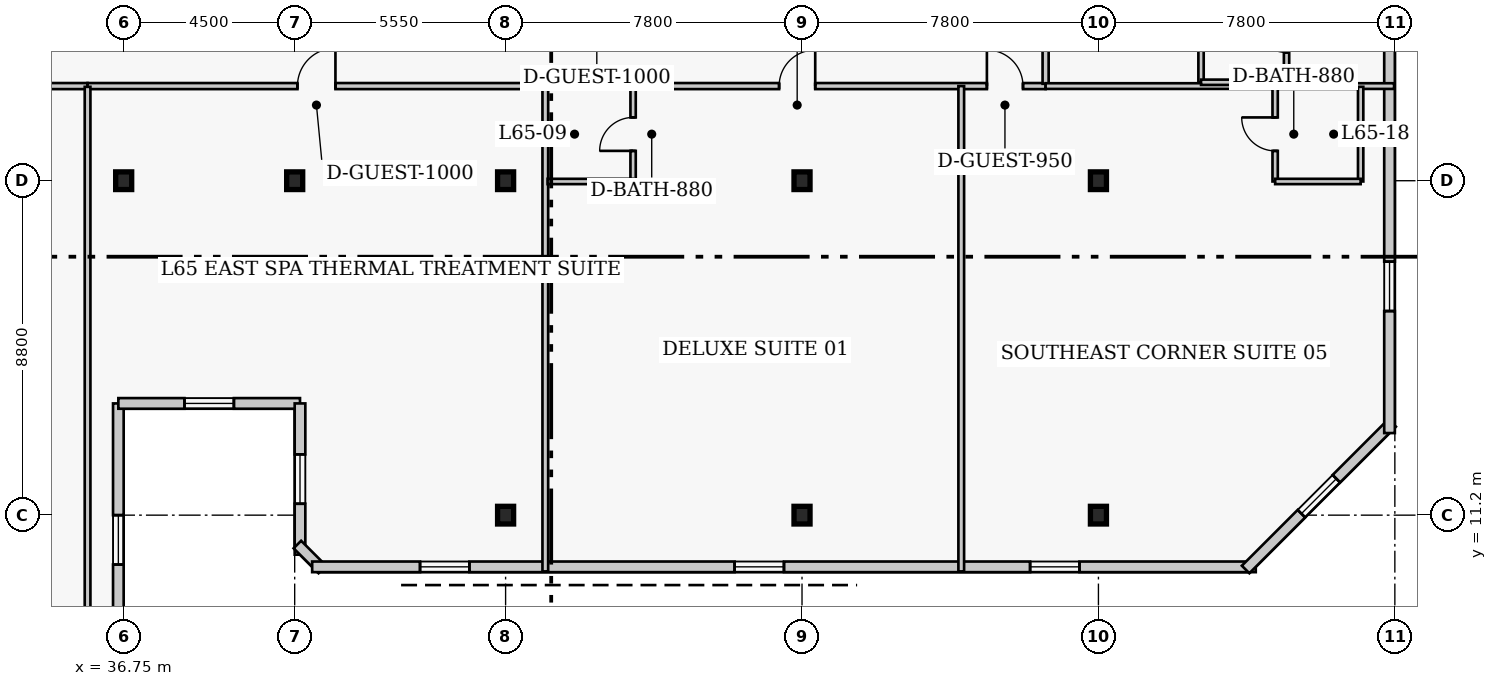
"""IFC4 building model, lengths in metres.
Left out: names, types, materials, properties, quantities, classifications, styles, units other than length and angle.
Written with IfcOpenShell. Run it as: python <this file> out.ifc"""

import sys

from ifc_helpers import new_model, si_unit, direction, frame, frame_2d, origin, origin_2d, place, context, subcontext, project, spatial, rectangle, i_section, extrude, element, fill, save


model = new_model("IFC4")
c1 = context("Model", 3, precision=1e-05, world=origin(), true_north=direction((0.0, 1.0)))
c2 = subcontext(c1, "Body", "Model", "MODEL_VIEW")
j1 = project(units=[si_unit("LENGTHUNIT", "METRE"), si_unit("PLANEANGLEUNIT", "RADIAN")], contexts=[c1])
p1 = place(None, origin())
s1 = spatial("IfcSite", under=j1, at=p1, CompositionType="ELEMENT")
p2 = place(p1, origin())
s2 = spatial("IfcBuilding", under=s1, at=p2, CompositionType="ELEMENT")
p3 = place(p2, frame((0.0, 0.0, 261.4)))
s3 = spatial("IfcBuildingStorey", under=s2, at=p3, CompositionType="ELEMENT", Elevation=261.4)
for number, where, z_axis, x_axis in (
    (1, (36.75, 20.0, 0.0), (0.0, 0.0, 1.0), (1.0, 0.0, 0.0)),
    (2, (41.25, 20.0, 0.0), (0.0, 0.0, 1.0), (1.0, 0.0, 0.0)),
    (3, (46.8, 11.2, 0.0), (0.0, 0.0, 1.0), (1.0, 0.0, 0.0)),
    (4, (46.8, 20.0, 0.0), (0.0, 0.0, 1.0), (1.0, 0.0, 0.0)),
    (5, (54.6, 11.2, 0.0), (0.0, 0.0, 1.0), (1.0, 0.0, 0.0)),
    (6, (54.6, 20.0, 0.0), (0.0, 0.0, 1.0), (1.0, 0.0, 0.0)),
    (7, (62.4, 11.2, 0.0), (0.0, 0.0, 1.0), (1.0, 0.0, 0.0)),
    (8, (62.4, 20.0, 0.0), (0.0, 0.0, 1.0), (1.0, 0.0, 0.0)),
):
    element("IfcColumn", number, at=place(p3, frame(where, z_axis=z_axis, x_axis=x_axis)), inside=s3, PredefinedType="COLUMN", context=c2, shape_type="SweptSolid", body=[
        extrude(i_section(OverallWidth=0.422, OverallDepth=0.465, WebThickness=0.045, FlangeThickness=0.073, FilletRadius=0.017, at=origin_2d()), origin(), (0.0, 0.0, 1.0), 4.0),
    ])
p4 = place(p3, frame((36.61, 6.96, 0.0), z_axis=(0.0, 0.0, 1.0), x_axis=(0.0, 1.0, 0.0)))
e9 = element("IfcWall", 9, at=p4, inside=s3, PredefinedType="SOLIDWALL", context=c2, shape_type="SweptSolid", body=[
    extrude(rectangle(XDim=7.18, YDim=0.28, at=frame_2d((3.59, 0.0))), origin(), (0.0, 0.0, 1.0), 3.76),
])
p5 = place(p4, frame((2.94, 0.0, 0.85)))
e10 = element("IfcOpeningElement", 10, at=p5, cuts=e9, PredefinedType="OPENING", context=c2, shape_type="SweptSolid", body=[
    extrude(rectangle(XDim=1.3, YDim=1.7, at=frame_2d((0.65, 0.85))), frame((0.0, 0.15, 0.0), z_axis=(0.0, -1.0, 0.0), x_axis=(1.0, 0.0, 0.0)), (0.0, 0.0, 1.0), 0.3),
])
p6 = place(p3, frame((36.61, 14.14, 0.0), z_axis=(0.0, 0.0, 1.0), x_axis=(1.0, 0.0, 0.0)))
e11 = element("IfcWall", 11, at=p6, inside=s3, PredefinedType="SOLIDWALL", context=c2, shape_type="SweptSolid", body=[
    extrude(rectangle(XDim=4.78, YDim=0.28, at=frame_2d((2.39, 0.0))), origin(), (0.0, 0.0, 1.0), 3.76),
])
p7 = place(p6, frame((1.74, 0.0, 0.85)))
e12 = element("IfcOpeningElement", 12, at=p7, cuts=e11, PredefinedType="OPENING", context=c2, shape_type="SweptSolid", body=[
    extrude(rectangle(XDim=1.3, YDim=1.7, at=frame_2d((0.65, 0.85))), frame((0.0, 0.15, 0.0), z_axis=(0.0, -1.0, 0.0), x_axis=(1.0, 0.0, 0.0)), (0.0, 0.0, 1.0), 0.3),
])
p8 = place(p3, frame((41.39, 14.14, 0.0), z_axis=(0.0, 0.0, 1.0), x_axis=(0.0, -1.0, 0.0)))
e13 = element("IfcWall", 13, at=p8, inside=s3, PredefinedType="SOLIDWALL", context=c2, shape_type="SweptSolid", body=[
    extrude(rectangle(XDim=3.98, YDim=0.28, at=frame_2d((1.99, 0.0))), origin(), (0.0, 0.0, 1.0), 3.76),
])
p9 = place(p8, frame((1.34, 0.0, 0.85)))
e14 = element("IfcOpeningElement", 14, at=p9, cuts=e13, PredefinedType="OPENING", context=c2, shape_type="SweptSolid", body=[
    extrude(rectangle(XDim=1.3, YDim=1.7, at=frame_2d((0.65, 0.85))), frame((0.0, 0.15, 0.0), z_axis=(0.0, -1.0, 0.0), x_axis=(1.0, 0.0, 0.0)), (0.0, 0.0, 1.0), 0.3),
])
p10 = place(p3, frame((41.321, 10.427, 0.0), z_axis=(0.0, 0.0, 1.0), x_axis=(0.707106781187, -0.707106781187, 0.0)))
e15 = element("IfcWall", 15, at=p10, inside=s3, PredefinedType="SOLIDWALL", context=c2, shape_type="SweptSolid", body=[
    extrude(rectangle(XDim=0.928, YDim=0.28, at=frame_2d((0.464, 0.0))), origin(), (0.0, 0.0, 1.0), 3.76),
])
p11 = place(p3, frame((41.71, 9.84, 0.0), z_axis=(0.0, 0.0, 1.0), x_axis=(1.0, 0.0, 0.0)))
e16 = element("IfcWall", 16, at=p11, inside=s3, PredefinedType="SOLIDWALL", context=c2, shape_type="SweptSolid", body=[
    extrude(rectangle(XDim=24.83, YDim=0.28, at=frame_2d((12.415, 0.0))), origin(), (0.0, 0.0, 1.0), 3.76),
])
p12 = place(p11, frame((2.838, 0.0, 0.85)))
e17 = element("IfcOpeningElement", 17, at=p12, cuts=e16, PredefinedType="OPENING", context=c2, shape_type="SweptSolid", body=[
    extrude(rectangle(XDim=1.3, YDim=1.7, at=frame_2d((0.65, 0.85))), frame((0.0, 0.15, 0.0), z_axis=(0.0, -1.0, 0.0), x_axis=(1.0, 0.0, 0.0)), (0.0, 0.0, 1.0), 0.3),
])
p13 = place(p11, frame((11.115, 0.0, 0.85)))
e18 = element("IfcOpeningElement", 18, at=p13, cuts=e16, PredefinedType="OPENING", context=c2, shape_type="SweptSolid", body=[
    extrude(rectangle(XDim=1.3, YDim=1.7, at=frame_2d((0.65, 0.85))), frame((0.0, 0.15, 0.0), z_axis=(0.0, -1.0, 0.0), x_axis=(1.0, 0.0, 0.0)), (0.0, 0.0, 1.0), 0.3),
])
p14 = place(p11, frame((18.892, 0.0, 0.85)))
e19 = element("IfcOpeningElement", 19, at=p14, cuts=e16, PredefinedType="OPENING", context=c2, shape_type="SweptSolid", body=[
    extrude(rectangle(XDim=1.3, YDim=1.7, at=frame_2d((0.65, 0.85))), frame((0.0, 0.15, 0.0), z_axis=(0.0, -1.0, 0.0), x_axis=(1.0, 0.0, 0.0)), (0.0, 0.0, 1.0), 0.3),
])
p15 = place(p3, frame((66.273, 9.771, 0.0), z_axis=(0.0, 0.0, 1.0), x_axis=(0.707129162587, 0.707084399077, 0.0)))
e20 = element("IfcWall", 20, at=p15, inside=s3, PredefinedType="SOLIDWALL", context=c2, shape_type="SweptSolid", body=[
    extrude(rectangle(XDim=5.454, YDim=0.28, at=frame_2d((2.727, 0.0))), origin(), (0.0, 0.0, 1.0), 3.76),
])
p16 = place(p15, frame((2.077, 0.0, 0.85)))
e21 = element("IfcOpeningElement", 21, at=p16, cuts=e20, PredefinedType="OPENING", context=c2, shape_type="SweptSolid", body=[
    extrude(rectangle(XDim=1.3, YDim=1.7, at=frame_2d((0.65, 0.85))), frame((0.0, 0.15, 0.0), z_axis=(0.0, -1.0, 0.0), x_axis=(1.0, 0.0, 0.0)), (0.0, 0.0, 1.0), 0.3),
])
p17 = place(p3, frame((70.06, 13.36, 0.0), z_axis=(0.0, 0.0, 1.0), x_axis=(0.0, 1.0, 0.0)))
e22 = element("IfcWall", 22, at=p17, inside=s3, PredefinedType="SOLIDWALL", context=c2, shape_type="SweptSolid", body=[
    extrude(rectangle(XDim=30.88, YDim=0.28, at=frame_2d((15.44, 0.0))), origin(), (0.0, 0.0, 1.0), 3.76),
])
p18 = place(p17, frame((3.21, 0.0, 0.85)))
e23 = element("IfcOpeningElement", 23, at=p18, cuts=e22, PredefinedType="OPENING", context=c2, shape_type="SweptSolid", body=[
    extrude(rectangle(XDim=1.3, YDim=1.7, at=frame_2d((0.65, 0.85))), frame((0.0, 0.15, 0.0), z_axis=(0.0, -1.0, 0.0), x_axis=(1.0, 0.0, 0.0)), (0.0, 0.0, 1.0), 0.3),
])
p19 = place(p17, frame((10.93, 0.0, 0.85)))
e24 = element("IfcOpeningElement", 24, at=p19, cuts=e22, PredefinedType="OPENING", context=c2, shape_type="SweptSolid", body=[
    extrude(rectangle(XDim=1.3, YDim=1.7, at=frame_2d((0.65, 0.85))), frame((0.0, 0.15, 0.0), z_axis=(0.0, -1.0, 0.0), x_axis=(1.0, 0.0, 0.0)), (0.0, 0.0, 1.0), 0.3),
])
p20 = place(p17, frame((18.65, 0.0, 0.85)))
e25 = element("IfcOpeningElement", 25, at=p20, cuts=e22, PredefinedType="OPENING", context=c2, shape_type="SweptSolid", body=[
    extrude(rectangle(XDim=1.3, YDim=1.7, at=frame_2d((0.65, 0.85))), frame((0.0, 0.15, 0.0), z_axis=(0.0, -1.0, 0.0), x_axis=(1.0, 0.0, 0.0)), (0.0, 0.0, 1.0), 0.3),
])
p21 = place(p17, frame((26.37, 0.0, 0.85)))
e26 = element("IfcOpeningElement", 26, at=p21, cuts=e22, PredefinedType="OPENING", context=c2, shape_type="SweptSolid", body=[
    extrude(rectangle(XDim=1.3, YDim=1.7, at=frame_2d((0.65, 0.85))), frame((0.0, 0.15, 0.0), z_axis=(0.0, -1.0, 0.0), x_axis=(1.0, 0.0, 0.0)), (0.0, 0.0, 1.0), 0.3),
])
p22 = place(p3, frame((19.1, 22.49, 0.0), z_axis=(0.0, 0.0, 1.0), x_axis=(1.0, 0.0, 0.0)))
e27 = element("IfcWall", 27, at=p22, inside=s3, PredefinedType="PARTITIONING", context=c2, shape_type="SweptSolid", body=[
    extrude(rectangle(XDim=16.7, YDim=0.16, at=frame_2d((8.35, 0.0))), origin(), (0.0, 0.0, 1.0), 3.76),
])
p23 = place(p22, frame((7.88, 0.0, 0.0)))
e28 = element("IfcOpeningElement", 28, at=p23, cuts=e27, PredefinedType="OPENING", context=c2, shape_type="SweptSolid", body=[
    extrude(rectangle(XDim=1.0, YDim=2.15, at=frame_2d((0.5, 1.075))), frame((0.0, 0.09, 0.0), z_axis=(0.0, -1.0, 0.0), x_axis=(1.0, 0.0, 0.0)), (0.0, 0.0, 1.0), 0.18),
])
p24 = place(p3, frame((35.8, 22.49, 0.0), z_axis=(0.0, 0.0, 1.0), x_axis=(1.0, 0.0, 0.0)))
e29 = element("IfcWall", 29, at=p24, inside=s3, PredefinedType="PARTITIONING", context=c2, shape_type="SweptSolid", body=[
    extrude(rectangle(XDim=25.21, YDim=0.16, at=frame_2d((12.605, 0.0))), origin(), (0.0, 0.0, 1.0), 3.76),
])
p25 = place(p24, frame((5.522, 0.0, 0.0)))
e30 = element("IfcOpeningElement", 30, at=p25, cuts=e29, PredefinedType="OPENING", context=c2, shape_type="SweptSolid", body=[
    extrude(rectangle(XDim=1.0, YDim=2.15, at=frame_2d((0.5, 1.075))), frame((0.0, 0.09, 0.0), z_axis=(0.0, -1.0, 0.0), x_axis=(1.0, 0.0, 0.0)), (0.0, 0.0, 1.0), 0.18),
])
p26 = place(p24, frame((18.198, 0.0, 0.0)))
e31 = element("IfcOpeningElement", 31, at=p26, cuts=e29, PredefinedType="OPENING", context=c2, shape_type="SweptSolid", body=[
    extrude(rectangle(XDim=0.95, YDim=2.1, at=frame_2d((0.475, 1.05))), frame((0.0, 0.09, 0.0), z_axis=(0.0, -1.0, 0.0), x_axis=(1.0, 0.0, 0.0)), (0.0, 0.0, 1.0), 0.18),
])
p27 = place(p24, frame((23.665, 0.0, 0.0)))
e32 = element("IfcOpeningElement", 32, at=p27, cuts=e29, PredefinedType="OPENING", context=c2, shape_type="SweptSolid", body=[
    extrude(rectangle(XDim=0.95, YDim=2.1, at=frame_2d((0.475, 1.05))), frame((0.0, 0.09, 0.0), z_axis=(0.0, -1.0, 0.0), x_axis=(1.0, 0.0, 0.0)), (0.0, 0.0, 1.0), 0.18),
])
p28 = place(p3, frame((61.01, 22.55, 0.0), z_axis=(0.0, 0.0, 1.0), x_axis=(0.0, 1.0, 0.0)))
e33 = element("IfcWall", 33, at=p28, inside=s3, PredefinedType="PARTITIONING", context=c2, shape_type="SweptSolid", body=[
    extrude(rectangle(XDim=18.1, YDim=0.16, at=frame_2d((9.05, 0.0))), origin(), (0.0, 0.0, 1.0), 3.76),
])
p29 = place(p28, frame((2.65, 0.0, 0.0)))
e34 = element("IfcOpeningElement", 34, at=p29, cuts=e33, PredefinedType="OPENING", context=c2, shape_type="SweptSolid", body=[
    extrude(rectangle(XDim=0.95, YDim=2.1, at=frame_2d((0.475, 1.05))), frame((0.0, 0.09, 0.0), z_axis=(0.0, -1.0, 0.0), x_axis=(1.0, 0.0, 0.0)), (0.0, 0.0, 1.0), 0.18),
])
p30 = place(p28, frame((9.175, 0.0, 0.0)))
e35 = element("IfcOpeningElement", 35, at=p30, cuts=e33, PredefinedType="OPENING", context=c2, shape_type="SweptSolid", body=[
    extrude(rectangle(XDim=0.95, YDim=2.1, at=frame_2d((0.475, 1.05))), frame((0.0, 0.09, 0.0), z_axis=(0.0, -1.0, 0.0), x_axis=(1.0, 0.0, 0.0)), (0.0, 0.0, 1.0), 0.18),
])
p31 = place(p28, frame((13.6, 0.0, 0.0)))
e36 = element("IfcOpeningElement", 36, at=p31, cuts=e33, PredefinedType="OPENING", context=c2, shape_type="SweptSolid", body=[
    extrude(rectangle(XDim=1.0, YDim=2.15, at=frame_2d((0.5, 1.075))), frame((0.0, 0.09, 0.0), z_axis=(0.0, -1.0, 0.0), x_axis=(1.0, 0.0, 0.0)), (0.0, 0.0, 1.0), 0.18),
])
p32 = place(p3, frame((35.8, 6.52, 0.0), z_axis=(0.0, 0.0, 1.0), x_axis=(0.0, 1.0, 0.0)))
e37 = element("IfcWall", 37, at=p32, inside=s3, PredefinedType="PARTITIONING", context=c2, shape_type="SweptSolid", body=[
    extrude(rectangle(XDim=15.95, YDim=0.15, at=frame_2d((7.975, 0.0))), origin(), (0.0, 0.0, 1.0), 3.76),
])
p33 = place(p3, frame((47.845, 9.72, 0.0), z_axis=(0.0, 0.0, 1.0), x_axis=(0.0, 1.0, 0.0)))
e38 = element("IfcWall", 38, at=p33, inside=s3, PredefinedType="PARTITIONING", context=c2, shape_type="SweptSolid", body=[
    extrude(rectangle(XDim=12.77, YDim=0.15, at=frame_2d((6.385, 0.0))), origin(), (0.0, 0.0, 1.0), 3.76),
])
p34 = place(p3, frame((50.155, 19.98, 0.0), z_axis=(0.0, 0.0, 1.0), x_axis=(0.0, 1.0, 0.0)))
e39 = element("IfcWall", 39, at=p34, inside=s3, PredefinedType="PLUMBINGWALL", context=c2, shape_type="SweptSolid", body=[
    extrude(rectangle(XDim=2.49, YDim=0.14, at=frame_2d((1.245, 0.0))), origin(), (0.0, 0.0, 1.0), 3.76),
])
p35 = place(p34, frame((0.805, 0.0, 0.0)))
e40 = element("IfcOpeningElement", 40, at=p35, cuts=e39, PredefinedType="OPENING", context=c2, shape_type="SweptSolid", body=[
    extrude(rectangle(XDim=0.88, YDim=2.05, at=frame_2d((0.44, 1.025))), frame((0.0, 0.08, 0.0), z_axis=(0.0, -1.0, 0.0), x_axis=(1.0, 0.0, 0.0)), (0.0, 0.0, 1.0), 0.16),
])
p36 = place(p3, frame((47.905, 19.98, 0.0), z_axis=(0.0, 0.0, 1.0), x_axis=(1.0, 0.0, 0.0)))
e41 = element("IfcWall", 41, at=p36, inside=s3, PredefinedType="PLUMBINGWALL", context=c2, shape_type="SweptSolid", body=[
    extrude(rectangle(XDim=2.25, YDim=0.14, at=frame_2d((1.125, 0.0))), origin(), (0.0, 0.0, 1.0), 3.064),
])
p37 = place(p3, frame((58.79, 9.72, 0.0), z_axis=(0.0, 0.0, 1.0), x_axis=(0.0, 1.0, 0.0)))
e42 = element("IfcWall", 42, at=p37, inside=s3, PredefinedType="PARTITIONING", context=c2, shape_type="SweptSolid", body=[
    extrude(rectangle(XDim=12.77, YDim=0.15, at=frame_2d((6.385, 0.0))), origin(), (0.0, 0.0, 1.0), 3.76),
])
p38 = place(p3, frame((61.01, 22.49, 0.0), z_axis=(0.0, 0.0, 1.0), x_axis=(1.0, 0.0, 0.0)))
e43 = element("IfcWall", 43, at=p38, inside=s3, PredefinedType="PARTITIONING", context=c2, shape_type="SweptSolid", body=[
    extrude(rectangle(XDim=9.17, YDim=0.15, at=frame_2d((4.585, 0.0))), origin(), (0.0, 0.0, 1.0), 3.76),
])
p39 = place(p3, frame((67.05, 19.98, 0.0), z_axis=(0.0, 0.0, 1.0), x_axis=(0.0, 1.0, 0.0)))
e44 = element("IfcWall", 44, at=p39, inside=s3, PredefinedType="PLUMBINGWALL", context=c2, shape_type="SweptSolid", body=[
    extrude(rectangle(XDim=2.49, YDim=0.14, at=frame_2d((1.245, 0.0))), origin(), (0.0, 0.0, 1.0), 3.76),
])
p40 = place(p39, frame((0.805, 0.0, 0.0)))
e45 = element("IfcOpeningElement", 45, at=p40, cuts=e44, PredefinedType="OPENING", context=c2, shape_type="SweptSolid", body=[
    extrude(rectangle(XDim=0.88, YDim=2.05, at=frame_2d((0.44, 1.025))), frame((0.0, 0.08, 0.0), z_axis=(0.0, -1.0, 0.0), x_axis=(1.0, 0.0, 0.0)), (0.0, 0.0, 1.0), 0.16),
])
p41 = place(p3, frame((69.3, 19.98, 0.0), z_axis=(0.0, 0.0, 1.0), x_axis=(0.0, 1.0, 0.0)))
e46 = element("IfcWall", 46, at=p41, inside=s3, PredefinedType="PLUMBINGWALL", context=c2, shape_type="SweptSolid", body=[
    extrude(rectangle(XDim=2.49, YDim=0.14, at=frame_2d((1.245, 0.0))), origin(), (0.0, 0.0, 1.0), 3.76),
])
p42 = place(p3, frame((67.05, 19.98, 0.0), z_axis=(0.0, 0.0, 1.0), x_axis=(1.0, 0.0, 0.0)))
e47 = element("IfcWall", 47, at=p42, inside=s3, PredefinedType="PLUMBINGWALL", context=c2, shape_type="SweptSolid", body=[
    extrude(rectangle(XDim=2.25, YDim=0.14, at=frame_2d((1.125, 0.0))), origin(), (0.0, 0.0, 1.0), 3.76),
])
p43 = place(p3, frame((65.1, 22.59, 0.0), z_axis=(0.0, 0.0, 1.0), x_axis=(0.0, 1.0, 0.0)))
e48 = element("IfcWall", 48, at=p43, inside=s3, PredefinedType="PLUMBINGWALL", context=c2, shape_type="SweptSolid", body=[
    extrude(rectangle(XDim=2.45, YDim=0.14, at=frame_2d((1.225, 0.0))), origin(), (0.0, 0.0, 1.0), 3.76),
])
p44 = place(p3, frame((67.35, 22.59, 0.0), z_axis=(0.0, 0.0, 1.0), x_axis=(0.0, 1.0, 0.0)))
e49 = element("IfcWall", 49, at=p44, inside=s3, PredefinedType="PLUMBINGWALL", context=c2, shape_type="SweptSolid", body=[
    extrude(rectangle(XDim=2.45, YDim=0.14, at=frame_2d((1.225, 0.0))), origin(), (0.0, 0.0, 1.0), 3.76),
])
p45 = place(p44, frame((0.785, 0.0, 0.0)))
e50 = element("IfcOpeningElement", 50, at=p45, cuts=e49, PredefinedType="OPENING", context=c2, shape_type="SweptSolid", body=[
    extrude(rectangle(XDim=0.88, YDim=2.05, at=frame_2d((0.44, 1.025))), frame((0.0, 0.08, 0.0), z_axis=(0.0, -1.0, 0.0), x_axis=(1.0, 0.0, 0.0)), (0.0, 0.0, 1.0), 0.16),
])
p46 = place(p3, frame((65.1, 22.59, 0.0), z_axis=(0.0, 0.0, 1.0), x_axis=(1.0, 0.0, 0.0)))
e51 = element("IfcWall", 51, at=p46, inside=s3, PredefinedType="PLUMBINGWALL", context=c2, shape_type="SweptSolid", body=[
    extrude(rectangle(XDim=2.25, YDim=0.14, at=frame_2d((1.125, 0.0))), origin(), (0.0, 0.0, 1.0), 3.76),
])
p47 = place(p5, origin())
e52 = element("IfcWindow", 52, at=p47, inside=s3, PartitioningType="SINGLE_PANEL", PredefinedType="WINDOW", context=c2, shape_type="SweptSolid", body=[
    extrude(rectangle(XDim=1.3, YDim=1.7, at=frame_2d((0.65, 0.85))), frame((0.0, 0.03, 0.0), z_axis=(0.0, -1.0, 0.0), x_axis=(1.0, 0.0, 0.0)), (0.0, 0.0, 1.0), 0.06),
])
fill(e10, e52)
p48 = place(p7, origin())
e53 = element("IfcWindow", 53, at=p48, inside=s3, PartitioningType="SINGLE_PANEL", PredefinedType="WINDOW", context=c2, shape_type="SweptSolid", body=[
    extrude(rectangle(XDim=1.3, YDim=1.7, at=frame_2d((0.65, 0.85))), frame((0.0, 0.03, 0.0), z_axis=(0.0, -1.0, 0.0), x_axis=(1.0, 0.0, 0.0)), (0.0, 0.0, 1.0), 0.06),
])
fill(e12, e53)
p49 = place(p9, origin())
e54 = element("IfcWindow", 54, at=p49, inside=s3, PartitioningType="SINGLE_PANEL", PredefinedType="WINDOW", context=c2, shape_type="SweptSolid", body=[
    extrude(rectangle(XDim=1.3, YDim=1.7, at=frame_2d((0.65, 0.85))), frame((0.0, 0.03, 0.0), z_axis=(0.0, -1.0, 0.0), x_axis=(1.0, 0.0, 0.0)), (0.0, 0.0, 1.0), 0.06),
])
fill(e14, e54)
p50 = place(p12, origin())
e55 = element("IfcWindow", 55, at=p50, inside=s3, PartitioningType="SINGLE_PANEL", PredefinedType="WINDOW", context=c2, shape_type="SweptSolid", body=[
    extrude(rectangle(XDim=1.3, YDim=1.7, at=frame_2d((0.65, 0.85))), frame((0.0, 0.03, 0.0), z_axis=(0.0, -1.0, 0.0), x_axis=(1.0, 0.0, 0.0)), (0.0, 0.0, 1.0), 0.06),
])
fill(e17, e55)
p51 = place(p13, origin())
e56 = element("IfcWindow", 56, at=p51, inside=s3, PartitioningType="SINGLE_PANEL", PredefinedType="WINDOW", context=c2, shape_type="SweptSolid", body=[
    extrude(rectangle(XDim=1.3, YDim=1.7, at=frame_2d((0.65, 0.85))), frame((0.0, 0.03, 0.0), z_axis=(0.0, -1.0, 0.0), x_axis=(1.0, 0.0, 0.0)), (0.0, 0.0, 1.0), 0.06),
])
fill(e18, e56)
p52 = place(p14, origin())
e57 = element("IfcWindow", 57, at=p52, inside=s3, PartitioningType="SINGLE_PANEL", PredefinedType="WINDOW", context=c2, shape_type="SweptSolid", body=[
    extrude(rectangle(XDim=1.3, YDim=1.7, at=frame_2d((0.65, 0.85))), frame((0.0, 0.03, 0.0), z_axis=(0.0, -1.0, 0.0), x_axis=(1.0, 0.0, 0.0)), (0.0, 0.0, 1.0), 0.06),
])
fill(e19, e57)
p53 = place(p16, origin())
e58 = element("IfcWindow", 58, at=p53, inside=s3, PartitioningType="SINGLE_PANEL", PredefinedType="WINDOW", context=c2, shape_type="SweptSolid", body=[
    extrude(rectangle(XDim=1.3, YDim=1.7, at=frame_2d((0.65, 0.85))), frame((0.0, 0.03, 0.0), z_axis=(0.0, -1.0, 0.0), x_axis=(1.0, 0.0, 0.0)), (0.0, 0.0, 1.0), 0.06),
])
fill(e21, e58)
p54 = place(p18, origin())
e59 = element("IfcWindow", 59, at=p54, inside=s3, PartitioningType="SINGLE_PANEL", PredefinedType="WINDOW", context=c2, shape_type="SweptSolid", body=[
    extrude(rectangle(XDim=1.3, YDim=1.7, at=frame_2d((0.65, 0.85))), frame((0.0, 0.03, 0.0), z_axis=(0.0, -1.0, 0.0), x_axis=(1.0, 0.0, 0.0)), (0.0, 0.0, 1.0), 0.06),
])
fill(e23, e59)
p55 = place(p25, origin())
e60 = element("IfcDoor", 60, at=p55, inside=s3, OperationType="SINGLE_SWING_RIGHT", PredefinedType="DOOR", context=c2, shape_type="SweptSolid", body=[
    extrude(rectangle(XDim=1.0, YDim=2.15, at=frame_2d((0.5, 1.075))), frame((0.0, 0.025, 0.0), z_axis=(0.0, -1.0, 0.0), x_axis=(1.0, 0.0, 0.0)), (0.0, 0.0, 1.0), 0.05),
])
fill(e30, e60)
p56 = place(p35, origin())
e61 = element("IfcDoor", 61, at=p56, inside=s3, OperationType="SINGLE_SWING_LEFT", PredefinedType="DOOR", context=c2, shape_type="SweptSolid", body=[
    extrude(rectangle(XDim=0.88, YDim=2.05, at=frame_2d((0.44, 1.025))), frame((0.0, 0.025, 0.0), z_axis=(0.0, -1.0, 0.0), x_axis=(1.0, 0.0, 0.0)), (0.0, 0.0, 1.0), 0.05),
])
fill(e40, e61)
p57 = place(p26, origin())
e62 = element("IfcDoor", 62, at=p57, inside=s3, OperationType="SINGLE_SWING_RIGHT", PredefinedType="DOOR", context=c2, shape_type="SweptSolid", body=[
    extrude(rectangle(XDim=0.95, YDim=2.1, at=frame_2d((0.475, 1.05))), frame((0.0, 0.025, 0.0), z_axis=(0.0, -1.0, 0.0), x_axis=(1.0, 0.0, 0.0)), (0.0, 0.0, 1.0), 0.05),
])
fill(e31, e62)
p58 = place(p40, origin())
e63 = element("IfcDoor", 63, at=p58, inside=s3, OperationType="SINGLE_SWING_RIGHT", PredefinedType="DOOR", context=c2, shape_type="SweptSolid", body=[
    extrude(rectangle(XDim=0.88, YDim=2.05, at=frame_2d((0.44, 1.025))), frame((0.0, 0.025, 0.0), z_axis=(0.0, -1.0, 0.0), x_axis=(1.0, 0.0, 0.0)), (0.0, 0.0, 1.0), 0.05),
])
fill(e45, e63)
p59 = place(p27, origin())
e64 = element("IfcDoor", 64, at=p59, inside=s3, OperationType="SINGLE_SWING_LEFT", PredefinedType="DOOR", context=c2, shape_type="SweptSolid", body=[
    extrude(rectangle(XDim=0.95, YDim=2.1, at=frame_2d((0.475, 1.05))), frame((0.0, 0.025, 0.0), z_axis=(0.0, -1.0, 0.0), x_axis=(1.0, 0.0, 0.0)), (0.0, 0.0, 1.0), 0.05),
])
fill(e32, e64)
p60 = place(p45, origin())
e65 = element("IfcDoor", 65, at=p60, inside=s3, OperationType="SINGLE_SWING_RIGHT", PredefinedType="DOOR", context=c2, shape_type="SweptSolid", body=[
    extrude(rectangle(XDim=0.88, YDim=2.05, at=frame_2d((0.44, 1.025))), frame((0.0, 0.025, 0.0), z_axis=(0.0, -1.0, 0.0), x_axis=(1.0, 0.0, 0.0)), (0.0, 0.0, 1.0), 0.05),
])
fill(e50, e65)
save(model, sys.argv[1])
